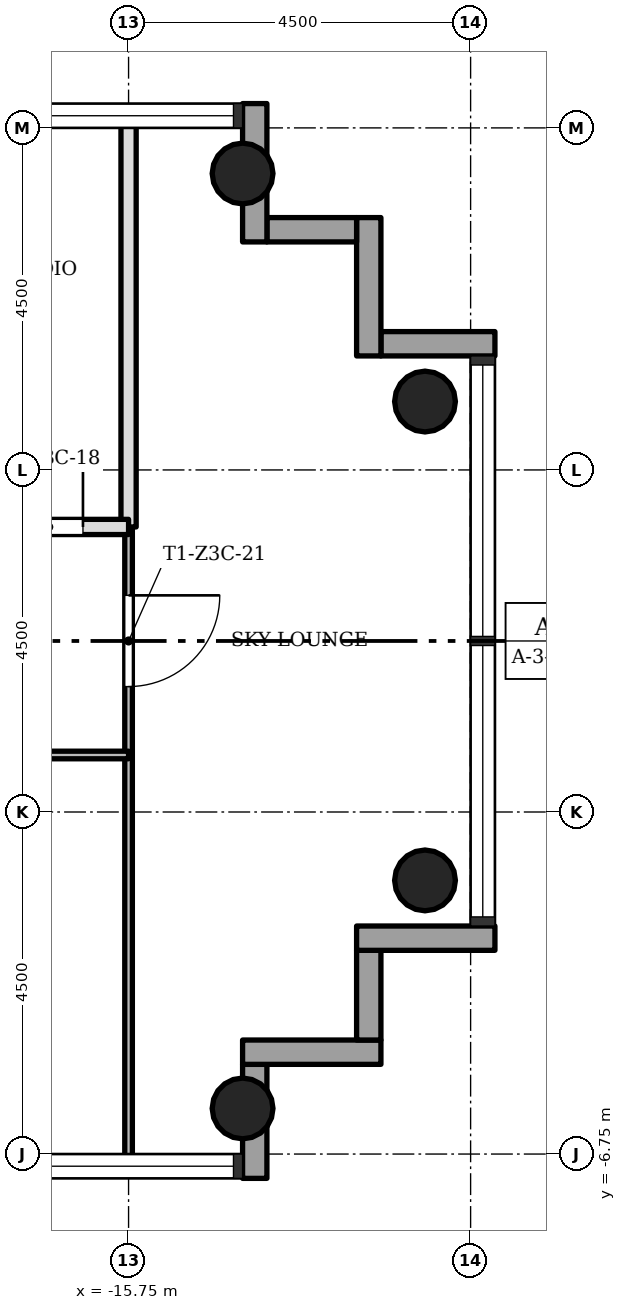
"""IFC4 building model, lengths in metres.
Left out: names, types, materials, properties, quantities, classifications, styles, units other than length and angle.
Written with IfcOpenShell. Run it as: python <this file> out.ifc"""

import sys

from ifc_helpers import new_model, si_unit, direction, frame, frame_2d, origin, origin_2d, place, context, subcontext, project, spatial, rectangle, hollow_circle, extrude, element, fill, save


model = new_model("IFC4")
c1 = context("Model", 3, precision=1e-05, world=origin(), true_north=direction((0.0, 1.0)))
c2 = subcontext(c1, "Body", "Model", "MODEL_VIEW")
j1 = project(units=[si_unit("LENGTHUNIT", "METRE"), si_unit("PLANEANGLEUNIT", "RADIAN")], contexts=[c1])
p1 = place(None, origin())
s1 = spatial("IfcSite", under=j1, at=p1, CompositionType="ELEMENT")
p2 = place(p1, origin())
s2 = spatial("IfcBuilding", under=s1, at=p2, CompositionType="ELEMENT")
p3 = place(p2, frame((0.0, 0.0, 160.9)))
s3 = spatial("IfcBuildingStorey", under=s2, at=p3, CompositionType="ELEMENT", Elevation=160.9)
for number, where, z_axis, x_axis in (
    (1, (-14.25, -6.15, 0.0), (0.0, 0.0, 1.0), (1.0, 0.0, 0.0)),
    (2, (-14.25, 6.15, 0.0), (0.0, 0.0, 1.0), (1.0, 0.0, 0.0)),
    (3, (-11.85, -3.15, 0.0), (0.0, 0.0, 1.0), (1.0, 0.0, 0.0)),
    (4, (-11.85, 3.15, 0.0), (0.0, 0.0, 1.0), (1.0, 0.0, 0.0)),
):
    element("IfcColumn", number, at=place(p3, frame(where, z_axis=z_axis, x_axis=x_axis)), inside=s3, PredefinedType="COLUMN", context=c2, shape_type="SweptSolid", body=[
        extrude(hollow_circle(Radius=0.4, WallThickness=0.028, at=origin_2d()), origin(), (0.0, 0.0, 1.0), 3.4),
    ])
p4 = place(p3, frame((-14.09, -7.07, -0.3), z_axis=(0.0, 0.0, 1.0), x_axis=(0.0, 1.0, 0.0)))
e5 = element("IfcWall", 5, at=p4, inside=s3, PredefinedType="STANDARD", context=c2, shape_type="SweptSolid", body=[
    extrude(rectangle(XDim=1.5, YDim=0.32, at=frame_2d((0.75, 0.0))), origin(), (0.0, 0.0, 1.0), 3.4),
])
p5 = place(p3, frame((-14.25, -5.41, -0.3), z_axis=(0.0, 0.0, 1.0), x_axis=(1.0, 0.0, 0.0)))
e6 = element("IfcWall", 6, at=p5, inside=s3, PredefinedType="STANDARD", context=c2, shape_type="SweptSolid", body=[
    extrude(rectangle(XDim=1.82, YDim=0.32, at=frame_2d((0.91, 0.0))), origin(), (0.0, 0.0, 1.0), 3.4),
])
p6 = place(p3, frame((-12.59, -5.25, -0.3), z_axis=(0.0, 0.0, 1.0), x_axis=(0.0, 1.0, 0.0)))
e7 = element("IfcWall", 7, at=p6, inside=s3, PredefinedType="STANDARD", context=c2, shape_type="SweptSolid", body=[
    extrude(rectangle(XDim=1.18, YDim=0.32, at=frame_2d((0.59, 0.0))), origin(), (0.0, 0.0, 1.0), 3.4),
])
p7 = place(p3, frame((-12.75, -3.91, -0.3), z_axis=(0.0, 0.0, 1.0), x_axis=(1.0, 0.0, 0.0)))
e8 = element("IfcWall", 8, at=p7, inside=s3, PredefinedType="STANDARD", context=c2, shape_type="SweptSolid", body=[
    extrude(rectangle(XDim=1.82, YDim=0.32, at=frame_2d((0.91, 0.0))), origin(), (0.0, 0.0, 1.0), 3.4),
])
p8 = place(p3, frame((-10.93, 3.91, -0.3), z_axis=(0.0, 0.0, 1.0), x_axis=(-1.0, 0.0, 0.0)))
e9 = element("IfcWall", 9, at=p8, inside=s3, PredefinedType="STANDARD", context=c2, shape_type="SweptSolid", body=[
    extrude(rectangle(XDim=1.5, YDim=0.32, at=frame_2d((0.75, 0.0))), origin(), (0.0, 0.0, 1.0), 3.4),
])
p9 = place(p3, frame((-12.59, 3.75, -0.3), z_axis=(0.0, 0.0, 1.0), x_axis=(0.0, 1.0, 0.0)))
e10 = element("IfcWall", 10, at=p9, inside=s3, PredefinedType="STANDARD", context=c2, shape_type="SweptSolid", body=[
    extrude(rectangle(XDim=1.82, YDim=0.32, at=frame_2d((0.91, 0.0))), origin(), (0.0, 0.0, 1.0), 3.4),
])
p10 = place(p3, frame((-12.75, 5.41, -0.3), z_axis=(0.0, 0.0, 1.0), x_axis=(-1.0, 0.0, 0.0)))
e11 = element("IfcWall", 11, at=p10, inside=s3, PredefinedType="STANDARD", context=c2, shape_type="SweptSolid", body=[
    extrude(rectangle(XDim=1.18, YDim=0.32, at=frame_2d((0.59, 0.0))), origin(), (0.0, 0.0, 1.0), 3.4),
])
p11 = place(p3, frame((-14.09, 5.25, -0.3), z_axis=(0.0, 0.0, 1.0), x_axis=(0.0, 1.0, 0.0)))
e12 = element("IfcWall", 12, at=p11, inside=s3, PredefinedType="STANDARD", context=c2, shape_type="SweptSolid", body=[
    extrude(rectangle(XDim=1.82, YDim=0.32, at=frame_2d((0.91, 0.0))), origin(), (0.0, 0.0, 1.0), 3.4),
])
p12 = place(p3, frame((-15.75, -6.85, 0.0), z_axis=(0.0, 0.0, 1.0), x_axis=(0.0, 1.0, 0.0)))
e13 = element("IfcWall", 13, at=p12, inside=s3, PredefinedType="PARTITIONING", context=c2, shape_type="SweptSolid", body=[
    extrude(rectangle(XDim=8.35, YDim=0.1, at=frame_2d((4.175, 0.0))), origin(), (0.0, 0.0, 1.0), 3.0),
])
p13 = place(p12, frame((6.25, 0.0, 0.0)))
e14 = element("IfcOpeningElement", 14, at=p13, cuts=e13, PredefinedType="OPENING", context=c2, shape_type="SweptSolid", body=[
    extrude(rectangle(XDim=1.2, YDim=2.1, at=frame_2d((0.6, 1.05))), frame((0.0, 0.06, 0.0), z_axis=(0.0, -1.0, 0.0), x_axis=(1.0, 0.0, 0.0)), (0.0, 0.0, 1.0), 0.12),
])
p14 = place(p3, frame((-15.75, 1.5, 0.0), z_axis=(0.0, 0.0, 1.0), x_axis=(0.0, 1.0, 0.0)))
e15 = element("IfcWall", 15, at=p14, inside=s3, PredefinedType="SOLIDWALL", context=c2, shape_type="SweptSolid", body=[
    extrude(rectangle(XDim=5.35, YDim=0.2, at=frame_2d((2.675, 0.0))), origin(), (0.0, 0.0, 1.0), 3.0),
])
p15 = place(p3, frame((-20.25, -1.5, 0.0), z_axis=(0.0, 0.0, 1.0), x_axis=(1.0, 0.0, 0.0)))
e16 = element("IfcWall", 16, at=p15, inside=s3, PredefinedType="PARTITIONING", context=c2, shape_type="SweptSolid", body=[
    extrude(rectangle(XDim=4.5, YDim=0.1, at=frame_2d((2.25, 0.0))), origin(), (0.0, 0.0, 1.0), 3.0),
])
p16 = place(p15, frame((1.8, 0.0, 0.0)))
e17 = element("IfcOpeningElement", 17, at=p16, cuts=e16, PredefinedType="OPENING", context=c2, shape_type="SweptSolid", body=[
    extrude(rectangle(XDim=0.9, YDim=2.1, at=frame_2d((0.45, 1.05))), frame((0.0, 0.06, 0.0), z_axis=(0.0, -1.0, 0.0), x_axis=(1.0, 0.0, 0.0)), (0.0, 0.0, 1.0), 0.12),
])
p17 = place(p3, frame((-20.25, 1.5, 0.0), z_axis=(0.0, 0.0, 1.0), x_axis=(1.0, 0.0, 0.0)))
e18 = element("IfcWall", 18, at=p17, inside=s3, PredefinedType="SOLIDWALL", context=c2, shape_type="SweptSolid", body=[
    extrude(rectangle(XDim=4.5, YDim=0.2, at=frame_2d((2.25, 0.0))), origin(), (0.0, 0.0, 1.0), 3.0),
])
p18 = place(p17, frame((3.0, 0.0, 0.0)))
e19 = element("IfcOpeningElement", 19, at=p18, cuts=e18, PredefinedType="OPENING", context=c2, shape_type="SweptSolid", body=[
    extrude(rectangle(XDim=0.9, YDim=2.1, at=frame_2d((0.45, 1.05))), frame((0.0, 0.11, 0.0), z_axis=(0.0, -1.0, 0.0), x_axis=(1.0, 0.0, 0.0)), (0.0, 0.0, 1.0), 0.22),
])
p19 = place(p18, origin())
e20 = element("IfcDoor", 20, at=p19, inside=s3, OperationType="SINGLE_SWING_LEFT", PredefinedType="DOOR", context=c2, shape_type="SweptSolid", body=[
    extrude(rectangle(XDim=0.9, YDim=2.1, at=frame_2d((0.45, 1.05))), frame((0.0, 0.025, 0.0), z_axis=(0.0, -1.0, 0.0), x_axis=(1.0, 0.0, 0.0)), (0.0, 0.0, 1.0), 0.05),
])
fill(e19, e20)
p20 = place(p13, origin())
e21 = element("IfcDoor", 21, at=p20, inside=s3, OperationType="SINGLE_SWING_RIGHT", PredefinedType="DOOR", context=c2, shape_type="SweptSolid", body=[
    extrude(rectangle(XDim=1.2, YDim=2.1, at=frame_2d((0.6, 1.05))), frame((0.0, 0.025, 0.0), z_axis=(0.0, -1.0, 0.0), x_axis=(1.0, 0.0, 0.0)), (0.0, 0.0, 1.0), 0.05),
])
fill(e14, e21)
save(model, sys.argv[1])
